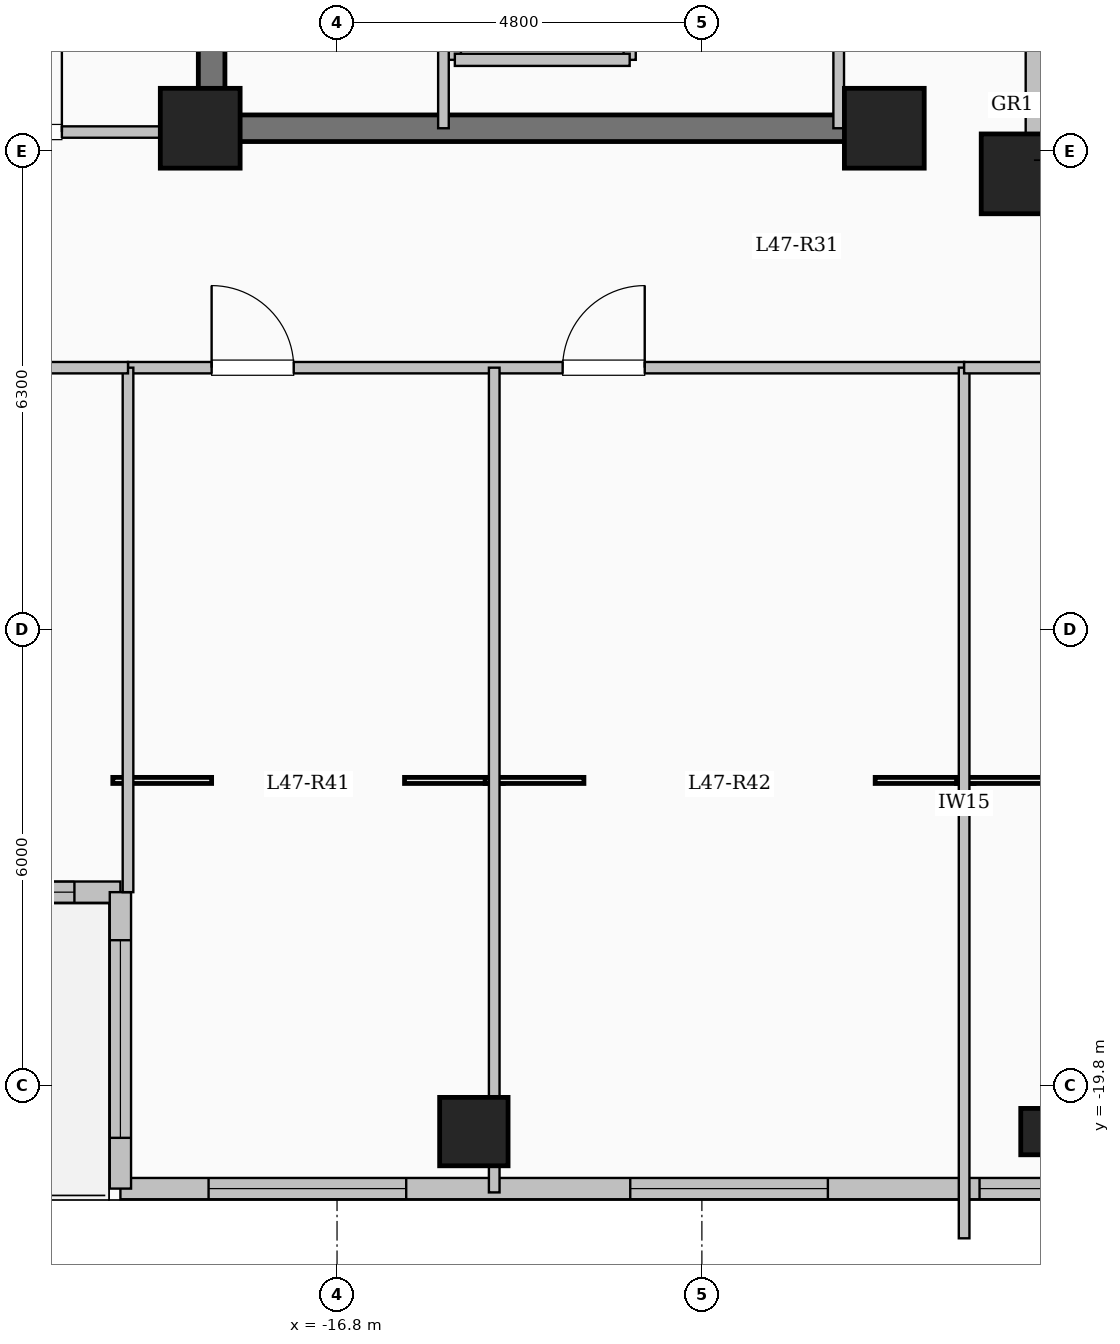
"""IFC4 building model, lengths in metres.
Left out: names, types, materials, properties, quantities, classifications, styles, units other than length and angle.
Written with IfcOpenShell. Run it as: python <this file> out.ifc"""

import sys

from ifc_helpers import new_model, si_unit, direction, frame, frame_2d, origin, origin_2d, place, context, subcontext, project, spatial, rectangle, hollow_circle, extrude, element, fill, save


model = new_model("IFC4")
c1 = context("Model", 3, precision=1e-05, world=origin(), true_north=direction((0.0, 1.0)))
c2 = subcontext(c1, "Body", "Model", "MODEL_VIEW")
j1 = project(units=[si_unit("LENGTHUNIT", "METRE"), si_unit("PLANEANGLEUNIT", "RADIAN")], contexts=[c1])
p1 = place(None, origin())
s1 = spatial("IfcSite", under=j1, at=p1, CompositionType="ELEMENT")
p2 = place(p1, origin())
s2 = spatial("IfcBuilding", under=s1, at=p2, CompositionType="ELEMENT")
p3 = place(p2, frame((0.0, 0.0, 172.8)))
s3 = spatial("IfcBuildingStorey", under=s2, at=p3, CompositionType="ELEMENT", Elevation=172.8)
for number, where, z_axis, x_axis in (
    (1, (-7.8, -7.8, 0.0), (0.0, 0.0, 1.0), (1.0, 0.0, 0.0)),
    (2, (-9.6, -7.2, 0.0), (0.0, 0.0, 1.0), (1.0, 0.0, 0.0)),
    (3, (-18.6, -7.2, 0.0), (0.0, 0.0, 1.0), (1.0, 0.0, 0.0)),
):
    element("IfcColumn", number, at=place(p3, frame(where, z_axis=z_axis, x_axis=x_axis)), inside=s3, PredefinedType="COLUMN", context=c2, shape_type="SweptSolid", body=[
        extrude(rectangle(XDim=1.05, YDim=1.05, at=origin_2d()), origin(), (0.0, 0.0, 1.0), 4.5),
    ])
p4 = place(p3, frame((-15.0, -20.4, 0.0), z_axis=(0.0, 0.0, 1.0), x_axis=(1.0, 0.0, 0.0)))
e4 = element("IfcColumn", 4, at=p4, inside=s3, PredefinedType="COLUMN", context=c2, shape_type="SweptSolid", body=[
    extrude(rectangle(XDim=0.9, YDim=0.9, at=origin_2d()), origin(), (0.0, 0.0, 1.0), 4.5),
])
p5 = place(p3, frame((-7.5, -20.4, 0.0), z_axis=(0.0, 0.0, 1.0), x_axis=(1.0, 0.0, 0.0)))
e5 = element("IfcColumn", 5, at=p5, inside=s3, PredefinedType="COLUMN", context=c2, shape_type="SweptSolid", body=[
    extrude(hollow_circle(Radius=0.305, WallThickness=0.025, at=origin_2d()), origin(), (0.0, 0.0, 1.0), 4.5),
])
p6 = place(p3, frame((-7.62, 7.62, 0.0), z_axis=(0.0, 0.0, 1.0), x_axis=(0.0, -1.0, 0.0)))
e6 = element("IfcWall", 6, at=p6, inside=s3, PredefinedType="SOLIDWALL", context=c2, shape_type="SweptSolid", body=[
    extrude(rectangle(XDim=15.24, YDim=0.24, at=frame_2d((7.62, 0.0))), origin(), (0.0, 0.0, 1.0), 4.2),
])
p7 = place(p6, frame((6.92, 0.0, 0.95)))
e7 = element("IfcOpeningElement", 7, at=p7, cuts=e6, PredefinedType="OPENING", context=c2, shape_type="SweptSolid", body=[
    extrude(rectangle(XDim=1.4, YDim=1.5, at=frame_2d((0.7, 0.75))), frame((0.0, 0.13, 0.0), z_axis=(0.0, -1.0, 0.0), x_axis=(1.0, 0.0, 0.0)), (0.0, 0.0, 1.0), 0.26),
])
p8 = place(p3, frame((-19.65, -17.25, 0.0), z_axis=(0.0, 0.0, 1.0), x_axis=(-1.0, 0.0, 0.0)))
e8 = element("IfcWall", 8, at=p8, inside=s3, PredefinedType="SOLIDWALL", context=c2, shape_type="SweptSolid", body=[
    extrude(rectangle(XDim=5.4, YDim=0.28, at=frame_2d((2.7, 0.0))), origin(), (0.0, 0.0, 1.0), 4.2),
])
p9 = place(p8, frame((2.25, 0.0, 0.0)))
e9 = element("IfcOpeningElement", 9, at=p9, cuts=e8, PredefinedType="OPENING", context=c2, shape_type="SweptSolid", body=[
    extrude(rectangle(XDim=1.1, YDim=2.2, at=frame_2d((0.55, 1.1))), frame((0.0, 0.15, 0.0), z_axis=(0.0, -1.0, 0.0), x_axis=(1.0, 0.0, 0.0)), (0.0, 0.0, 1.0), 0.3),
])
p10 = place(p8, frame((0.605, 0.0, 0.95)))
e10 = element("IfcOpeningElement", 10, at=p10, cuts=e8, PredefinedType="OPENING", context=c2, shape_type="SweptSolid", body=[
    extrude(rectangle(XDim=1.2, YDim=1.5, at=frame_2d((0.6, 0.75))), frame((0.0, 0.15, 0.0), z_axis=(0.0, -1.0, 0.0), x_axis=(1.0, 0.0, 0.0)), (0.0, 0.0, 1.0), 0.3),
])
p11 = place(p3, frame((-7.35, -21.15, 0.0), z_axis=(0.0, 0.0, 1.0), x_axis=(-1.0, 0.0, 0.0)))
e11 = element("IfcWall", 11, at=p11, inside=s3, PredefinedType="SOLIDWALL", context=c2, shape_type="SweptSolid", body=[
    extrude(rectangle(XDim=12.3, YDim=0.28, at=frame_2d((6.15, 0.0))), origin(), (0.0, 0.0, 1.0), 4.2),
])
p12 = place(p11, frame((0.147, 0.0, 0.95)))
e12 = element("IfcOpeningElement", 12, at=p12, cuts=e11, PredefinedType="OPENING", context=c2, shape_type="SweptSolid", body=[
    extrude(rectangle(XDim=0.85, YDim=1.5, at=frame_2d((0.425, 0.75))), frame((0.0, 0.15, 0.0), z_axis=(0.0, -1.0, 0.0), x_axis=(1.0, 0.0, 0.0)), (0.0, 0.0, 1.0), 0.3),
])
p13 = place(p11, frame((2.992, 0.0, 0.85)))
e13 = element("IfcOpeningElement", 13, at=p13, cuts=e11, PredefinedType="OPENING", context=c2, shape_type="SweptSolid", body=[
    extrude(rectangle(XDim=2.6, YDim=2.4, at=frame_2d((1.3, 1.2))), frame((0.0, 0.15, 0.0), z_axis=(0.0, -1.0, 0.0), x_axis=(1.0, 0.0, 0.0)), (0.0, 0.0, 1.0), 0.3),
])
p14 = place(p11, frame((8.54, 0.0, 0.85)))
e14 = element("IfcOpeningElement", 14, at=p14, cuts=e11, PredefinedType="OPENING", context=c2, shape_type="SweptSolid", body=[
    extrude(rectangle(XDim=2.6, YDim=2.4, at=frame_2d((1.3, 1.2))), frame((0.0, 0.15, 0.0), z_axis=(0.0, -1.0, 0.0), x_axis=(1.0, 0.0, 0.0)), (0.0, 0.0, 1.0), 0.3),
])
p15 = place(p3, frame((-19.65, -21.15, 0.0), z_axis=(0.0, 0.0, 1.0), x_axis=(0.0, 1.0, 0.0)))
e15 = element("IfcWall", 15, at=p15, inside=s3, PredefinedType="SOLIDWALL", context=c2, shape_type="SweptSolid", body=[
    extrude(rectangle(XDim=3.9, YDim=0.28, at=frame_2d((1.95, 0.0))), origin(), (0.0, 0.0, 1.0), 4.2),
])
p16 = place(p15, frame((0.668, 0.0, 0.85)))
e16 = element("IfcOpeningElement", 16, at=p16, cuts=e15, PredefinedType="OPENING", context=c2, shape_type="SweptSolid", body=[
    extrude(rectangle(XDim=2.6, YDim=2.4, at=frame_2d((1.3, 1.2))), frame((0.0, 0.15, 0.0), z_axis=(0.0, -1.0, 0.0), x_axis=(1.0, 0.0, 0.0)), (0.0, 0.0, 1.0), 0.3),
])
for number, where, z_axis, x_axis in (
    (17, (-15.25, -6.3, 0.0), (0.0, 0.0, 1.0), (0.0, 1.0, 0.0)),
    (18, (-12.95, -6.3, 0.0), (0.0, 0.0, 1.0), (0.0, 1.0, 0.0)),
):
    element("IfcWall", number, at=place(p3, frame(where, z_axis=z_axis, x_axis=x_axis)), inside=s3, PredefinedType="SOLIDWALL", context=c2, shape_type="SweptSolid", body=[
        extrude(rectangle(XDim=2.6, YDim=0.16, at=frame_2d((1.3, 0.0))), origin(), (0.0, 0.0, 1.0), 4.2),
    ])
p17 = place(p3, frame((-15.25, -6.3, 0.0), z_axis=(0.0, 0.0, 1.0), x_axis=(1.0, 0.0, 0.0)))
e19 = element("IfcWall", 19, at=p17, inside=s3, PredefinedType="SOLIDWALL", context=c2, shape_type="SweptSolid", body=[
    extrude(rectangle(XDim=2.3, YDim=0.16, at=frame_2d((1.15, 0.0))), origin(), (0.0, 0.0, 1.0), 4.2),
])
p18 = place(p3, frame((-18.45, -7.375, 0.0), z_axis=(0.0, 0.0, 1.0), x_axis=(0.0, 1.0, 0.0)))
e20 = element("IfcWall", 20, at=p18, inside=s3, PredefinedType="SHEAR", context=c2, shape_type="SweptSolid", body=[
    extrude(rectangle(XDim=14.05, YDim=0.35, at=frame_2d((7.025, 0.0))), origin(), (0.0, 0.0, 1.0), 4.5),
])
p19 = place(p3, frame((-18.625, -7.2, 0.0), z_axis=(0.0, 0.0, 1.0), x_axis=(1.0, 0.0, 0.0)))
e21 = element("IfcWall", 21, at=p19, inside=s3, PredefinedType="SHEAR", context=c2, shape_type="SweptSolid", body=[
    extrude(rectangle(XDim=8.55, YDim=0.35, at=frame_2d((4.275, 0.0))), origin(), (0.0, 0.0, 1.0), 4.5),
])
p20 = place(p3, frame((-15.4, -7.2, 0.0), z_axis=(0.0, 0.0, 1.0), x_axis=(0.0, 1.0, 0.0)))
e22 = element("IfcWall", 22, at=p20, inside=s3, PredefinedType="PARTITIONING", context=c2, shape_type="SweptSolid", body=[
    extrude(rectangle(XDim=10.45, YDim=0.14, at=frame_2d((5.225, 0.0))), origin(), (0.0, 0.0, 1.0), 4.2),
])
p21 = place(p20, frame((9.25, 0.0, 0.0)))
e23 = element("IfcOpeningElement", 23, at=p21, cuts=e22, PredefinedType="OPENING", context=c2, shape_type="SweptSolid", body=[
    extrude(rectangle(XDim=0.9, YDim=2.08, at=frame_2d((0.45, 1.04))), frame((0.0, 0.08, 0.0), z_axis=(0.0, -1.0, 0.0), x_axis=(1.0, 0.0, 0.0)), (0.0, 0.0, 1.0), 0.16),
])
p22 = place(p3, frame((-10.2, -7.2, 0.0), z_axis=(0.0, 0.0, 1.0), x_axis=(0.0, 1.0, 0.0)))
e24 = element("IfcWall", 24, at=p22, inside=s3, PredefinedType="PARTITIONING", context=c2, shape_type="SweptSolid", body=[
    extrude(rectangle(XDim=9.12, YDim=0.14, at=frame_2d((4.56, 0.0))), origin(), (0.0, 0.0, 1.0), 4.2),
])
p23 = place(p22, frame((1.9, 0.0, 0.0)))
e25 = element("IfcOpeningElement", 25, at=p23, cuts=e24, PredefinedType="OPENING", context=c2, shape_type="SweptSolid", body=[
    extrude(rectangle(XDim=0.95, YDim=2.12, at=frame_2d((0.475, 1.06))), frame((0.0, 0.08, 0.0), z_axis=(0.0, -1.0, 0.0), x_axis=(1.0, 0.0, 0.0)), (0.0, 0.0, 1.0), 0.16),
])
p24 = place(p22, frame((6.6, 0.0, 0.0)))
e26 = element("IfcOpeningElement", 26, at=p24, cuts=e24, PredefinedType="OPENING", context=c2, shape_type="SweptSolid", body=[
    extrude(rectangle(XDim=0.95, YDim=2.12, at=frame_2d((0.475, 1.06))), frame((0.0, 0.08, 0.0), z_axis=(0.0, -1.0, 0.0), x_axis=(1.0, 0.0, 0.0)), (0.0, 0.0, 1.0), 0.16),
])
p25 = place(p3, frame((-19.55, -10.35, 0.0), z_axis=(0.0, 0.0, 1.0), x_axis=(1.0, 0.0, 0.0)))
e27 = element("IfcWall", 27, at=p25, inside=s3, PredefinedType="PARTITIONING", context=c2, shape_type="SweptSolid", body=[
    extrude(rectangle(XDim=11.0, YDim=0.15, at=frame_2d((5.5, 0.0))), origin(), (0.0, 0.0, 1.0), 4.2),
])
p26 = place(p25, frame((1.1, 0.0, 0.0)))
e28 = element("IfcOpeningElement", 28, at=p26, cuts=e27, PredefinedType="OPENING", context=c2, shape_type="SweptSolid", body=[
    extrude(rectangle(XDim=1.08, YDim=2.15, at=frame_2d((0.54, 1.075))), frame((0.0, 0.085, 0.0), z_axis=(0.0, -1.0, 0.0), x_axis=(1.0, 0.0, 0.0)), (0.0, 0.0, 1.0), 0.17),
])
p27 = place(p25, frame((5.718, 0.0, 0.0)))
e29 = element("IfcOpeningElement", 29, at=p27, cuts=e27, PredefinedType="OPENING", context=c2, shape_type="SweptSolid", body=[
    extrude(rectangle(XDim=1.08, YDim=2.15, at=frame_2d((0.54, 1.075))), frame((0.0, 0.085, 0.0), z_axis=(0.0, -1.0, 0.0), x_axis=(1.0, 0.0, 0.0)), (0.0, 0.0, 1.0), 0.17),
])
p28 = place(p3, frame((-14.732, -21.2, 0.0), z_axis=(0.0, 0.0, 1.0), x_axis=(0.0, 1.0, 0.0)))
e30 = element("IfcWall", 30, at=p28, inside=s3, PredefinedType="PARTITIONING", context=c2, shape_type="SweptSolid", body=[
    extrude(rectangle(XDim=10.85, YDim=0.14, at=frame_2d((5.425, 0.0))), origin(), (0.0, 0.0, 1.0), 3.685),
])
p29 = place(p3, frame((-8.55, -21.804, 0.0), z_axis=(0.0, 0.0, 1.0), x_axis=(0.0, 1.0, 0.0)))
e31 = element("IfcWall", 31, at=p29, inside=s3, PredefinedType="PARTITIONING", context=c2, shape_type="SweptSolid", body=[
    extrude(rectangle(XDim=11.454, YDim=0.14, at=frame_2d((5.727, 0.0))), origin(), (0.0, 0.0, 1.0), 4.2),
])
p30 = place(p3, frame((-8.55, -10.35, 0.0), z_axis=(0.0, 0.0, 1.0), x_axis=(1.0, 0.0, 0.0)))
e32 = element("IfcWall", 32, at=p30, inside=s3, PredefinedType="PARTITIONING", context=c2, shape_type="SweptSolid", body=[
    extrude(rectangle(XDim=17.1, YDim=0.15, at=frame_2d((8.55, 0.0))), origin(), (0.0, 0.0, 1.0), 4.2),
])
p31 = place(p30, frame((1.4, 0.0, 0.0)))
e33 = element("IfcOpeningElement", 33, at=p31, cuts=e32, PredefinedType="OPENING", context=c2, shape_type="SweptSolid", body=[
    extrude(rectangle(XDim=1.2, YDim=2.15, at=frame_2d((0.6, 1.075))), frame((0.0, 0.085, 0.0), z_axis=(0.0, -1.0, 0.0), x_axis=(1.0, 0.0, 0.0)), (0.0, 0.0, 1.0), 0.17),
])
p32 = place(p3, frame((-25.08, -7.25, 0.0), z_axis=(0.0, 0.0, 1.0), x_axis=(1.0, 0.0, 0.0)))
e34 = element("IfcWall", 34, at=p32, inside=s3, PredefinedType="PARTITIONING", context=c2, shape_type="SweptSolid", body=[
    extrude(rectangle(XDim=6.63, YDim=0.15, at=frame_2d((3.315, 0.0))), origin(), (0.0, 0.0, 1.0), 4.2),
])
p33 = place(p32, frame((3.58, 0.0, 0.0)))
e35 = element("IfcOpeningElement", 35, at=p33, cuts=e34, PredefinedType="OPENING", context=c2, shape_type="SweptSolid", body=[
    extrude(rectangle(XDim=1.08, YDim=2.15, at=frame_2d((0.54, 1.075))), frame((0.0, 0.085, 0.0), z_axis=(0.0, -1.0, 0.0), x_axis=(1.0, 0.0, 0.0)), (0.0, 0.0, 1.0), 0.17),
])
p34 = place(p3, frame((-19.55, -17.25, 0.0), z_axis=(0.0, 0.0, 1.0), x_axis=(0.0, 1.0, 0.0)))
e36 = element("IfcWall", 36, at=p34, inside=s3, PredefinedType="PARTITIONING", context=c2, shape_type="SweptSolid", body=[
    extrude(rectangle(XDim=6.9, YDim=0.14, at=frame_2d((3.45, 0.0))), origin(), (0.0, 0.0, 1.0), 4.2),
])
p35 = place(p3, frame((-25.08, -10.35, 0.0), z_axis=(0.0, 0.0, 1.0), x_axis=(1.0, 0.0, 0.0)))
e37 = element("IfcWall", 37, at=p35, inside=s3, PredefinedType="PARTITIONING", context=c2, shape_type="SweptSolid", body=[
    extrude(rectangle(XDim=5.53, YDim=0.15, at=frame_2d((2.765, 0.0))), origin(), (0.0, 0.0, 1.0), 4.2),
])
p36 = place(p35, frame((2.29, 0.0, 0.0)))
e38 = element("IfcOpeningElement", 38, at=p36, cuts=e37, PredefinedType="OPENING", context=c2, shape_type="SweptSolid", body=[
    extrude(rectangle(XDim=0.95, YDim=2.15, at=frame_2d((0.475, 1.075))), frame((0.0, 0.085, 0.0), z_axis=(0.0, -1.0, 0.0), x_axis=(1.0, 0.0, 0.0)), (0.0, 0.0, 1.0), 0.17),
])
p37 = place(p10, origin())
e39 = element("IfcWindow", 39, at=p37, inside=s3, PartitioningType="SINGLE_PANEL", PredefinedType="WINDOW", context=c2, shape_type="SweptSolid", body=[
    extrude(rectangle(XDim=1.2, YDim=1.5, at=frame_2d((0.6, 0.75))), frame((0.0, 0.03, 0.0), z_axis=(0.0, -1.0, 0.0), x_axis=(1.0, 0.0, 0.0)), (0.0, 0.0, 1.0), 0.06),
])
fill(e10, e39)
p38 = place(p12, origin())
e40 = element("IfcWindow", 40, at=p38, inside=s3, PartitioningType="SINGLE_PANEL", PredefinedType="WINDOW", context=c2, shape_type="SweptSolid", body=[
    extrude(rectangle(XDim=0.85, YDim=1.5, at=frame_2d((0.425, 0.75))), frame((0.0, 0.03, 0.0), z_axis=(0.0, -1.0, 0.0), x_axis=(1.0, 0.0, 0.0)), (0.0, 0.0, 1.0), 0.06),
])
fill(e12, e40)
p39 = place(p13, origin())
e41 = element("IfcWindow", 41, at=p39, inside=s3, PartitioningType="SINGLE_PANEL", PredefinedType="WINDOW", context=c2, shape_type="SweptSolid", body=[
    extrude(rectangle(XDim=2.6, YDim=2.4, at=frame_2d((1.3, 1.2))), frame((0.0, 0.03, 0.0), z_axis=(0.0, -1.0, 0.0), x_axis=(1.0, 0.0, 0.0)), (0.0, 0.0, 1.0), 0.06),
])
fill(e13, e41)
p40 = place(p14, origin())
e42 = element("IfcWindow", 42, at=p40, inside=s3, PartitioningType="SINGLE_PANEL", PredefinedType="WINDOW", context=c2, shape_type="SweptSolid", body=[
    extrude(rectangle(XDim=2.6, YDim=2.4, at=frame_2d((1.3, 1.2))), frame((0.0, 0.03, 0.0), z_axis=(0.0, -1.0, 0.0), x_axis=(1.0, 0.0, 0.0)), (0.0, 0.0, 1.0), 0.06),
])
fill(e14, e42)
p41 = place(p16, origin())
e43 = element("IfcWindow", 43, at=p41, inside=s3, PartitioningType="SINGLE_PANEL", PredefinedType="WINDOW", context=c2, shape_type="SweptSolid", body=[
    extrude(rectangle(XDim=2.6, YDim=2.4, at=frame_2d((1.3, 1.2))), frame((0.0, 0.03, 0.0), z_axis=(0.0, -1.0, 0.0), x_axis=(1.0, 0.0, 0.0)), (0.0, 0.0, 1.0), 0.06),
])
fill(e16, e43)
p42 = place(p26, origin())
e44 = element("IfcDoor", 44, at=p42, inside=s3, OperationType="SINGLE_SWING_LEFT", PredefinedType="DOOR", context=c2, shape_type="SweptSolid", body=[
    extrude(rectangle(XDim=1.08, YDim=2.15, at=frame_2d((0.54, 1.075))), frame((0.0, 0.025, 0.0), z_axis=(0.0, -1.0, 0.0), x_axis=(1.0, 0.0, 0.0)), (0.0, 0.0, 1.0), 0.05),
])
fill(e28, e44)
p43 = place(p27, origin())
e45 = element("IfcDoor", 45, at=p43, inside=s3, OperationType="SINGLE_SWING_RIGHT", PredefinedType="DOOR", context=c2, shape_type="SweptSolid", body=[
    extrude(rectangle(XDim=1.08, YDim=2.15, at=frame_2d((0.54, 1.075))), frame((0.0, 0.025, 0.0), z_axis=(0.0, -1.0, 0.0), x_axis=(1.0, 0.0, 0.0)), (0.0, 0.0, 1.0), 0.05),
])
fill(e29, e45)
p44 = place(p33, origin())
e46 = element("IfcDoor", 46, at=p44, inside=s3, OperationType="SINGLE_SWING_RIGHT", PredefinedType="DOOR", context=c2, shape_type="SweptSolid", body=[
    extrude(rectangle(XDim=1.08, YDim=2.15, at=frame_2d((0.54, 1.075))), frame((0.0, 0.025, 0.0), z_axis=(0.0, -1.0, 0.0), x_axis=(1.0, 0.0, 0.0)), (0.0, 0.0, 1.0), 0.05),
])
fill(e35, e46)
save(model, sys.argv[1])
